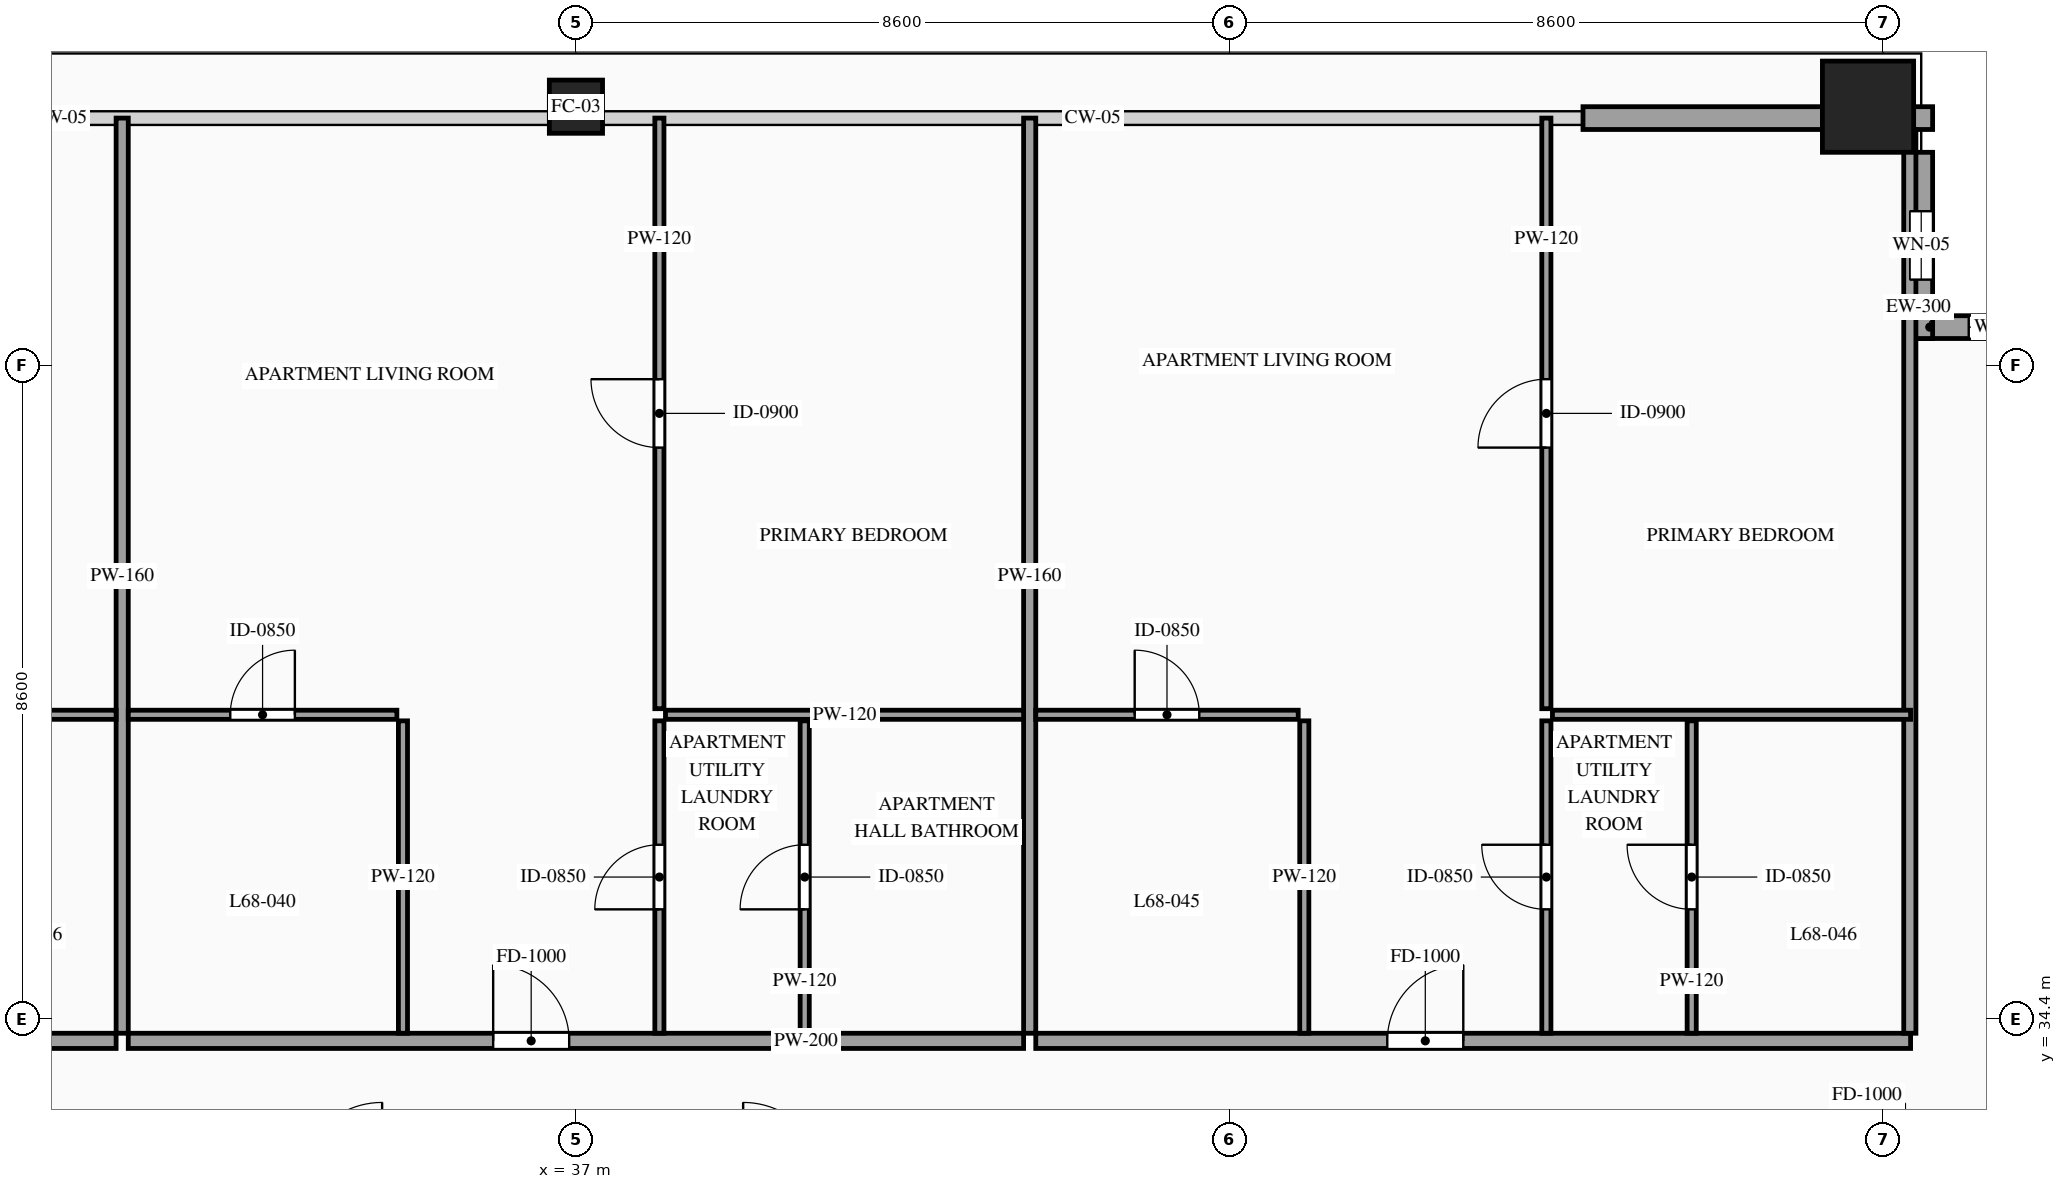
"""IFC4 building model, lengths in metres.
Left out: names, types, materials, properties, quantities, classifications, styles, units other than length and angle.
Written with IfcOpenShell. Run it as: python <this file> out.ifc"""

import sys

from ifc_helpers import new_model, si_unit, direction, frame, frame_2d, origin, origin_2d, place, context, subcontext, project, spatial, rectangle, hollow_rectangle, extrude, source, transform, mapped, element, fill, save


model = new_model("IFC4")
c1 = context("Model", 3, precision=1e-05, world=origin(), true_north=direction((0.0, 1.0)))
c2 = subcontext(c1, "Body", "Model", "MODEL_VIEW")
j1 = project(units=[si_unit("LENGTHUNIT", "METRE"), si_unit("PLANEANGLEUNIT", "RADIAN")], contexts=[c1])
p1 = place(None, origin())
s1 = spatial("IfcSite", under=j1, at=p1, CompositionType="ELEMENT")
p2 = place(p1, origin())
s2 = spatial("IfcBuilding", under=s1, at=p2, CompositionType="ELEMENT")
p3 = place(p2, frame((0.0, 0.0, 255.6)))
s3 = spatial("IfcBuildingStorey", under=s2, at=p3, CompositionType="ELEMENT", Elevation=255.6)
m1 = source(origin(), c2, "Body", "SweptSolid", [
    extrude(hollow_rectangle(XDim=0.7, YDim=0.7, WallThickness=0.032, at=origin_2d()), origin(), (0.0, 0.0, 1.0), 3.5),
])
p4 = place(p3, frame((37.0, 46.4, 0.0), z_axis=(0.0, 0.0, 1.0), x_axis=(1.0, 0.0, 0.0)))
e1 = element("IfcColumn", 1, at=p4, inside=s3, PredefinedType="COLUMN", context=c2, shape_type="MappedRepresentation", body=[
    mapped(m1, transform((0.0, 0.0, 0.0), scale=1.0)),
])
m2 = source(origin(), c2, "Body", "SweptSolid", [
    extrude(hollow_rectangle(XDim=1.2, YDim=1.2, WallThickness=0.055, at=origin_2d()), origin(), (0.0, 0.0, 1.0), 3.5),
])
p5 = place(p3, frame((54.0, 46.4, 0.0), z_axis=(0.0, 0.0, 1.0), x_axis=(1.0, 0.0, 0.0)))
e2 = element("IfcColumn", 2, at=p5, inside=s3, PredefinedType="COLUMN", context=c2, shape_type="MappedRepresentation", body=[
    mapped(m2, transform((0.0, 0.0, 0.0), scale=1.0)),
])
p6 = place(p3, frame((57.0, 43.5, 0.0), z_axis=(0.0, 0.0, 1.0), x_axis=(-1.0, 0.0, 0.0)))
e3 = element("IfcWall", 3, at=p6, inside=s3, PredefinedType="SOLIDWALL", context=c2, shape_type="SweptSolid", body=[
    extrude(rectangle(XDim=2.45, YDim=0.3, at=frame_2d((1.225, 0.0))), origin(), (0.0, 0.0, 1.0), 3.2),
])
p7 = place(p6, frame((0.775, 0.0, 0.75)))
e4 = element("IfcOpeningElement", 4, at=p7, cuts=e3, PredefinedType="OPENING", context=c2, shape_type="SweptSolid", body=[
    extrude(rectangle(XDim=0.9, YDim=1.5, at=frame_2d((0.45, 0.75))), frame((0.0, 0.165, 0.0), z_axis=(0.0, -1.0, 0.0), x_axis=(1.0, 0.0, 0.0)), (0.0, 0.0, 1.0), 0.33),
])
p8 = place(p3, frame((54.7, 43.35, 0.0), z_axis=(0.0, 0.0, 1.0), x_axis=(0.0, 1.0, 0.0)))
e5 = element("IfcWall", 5, at=p8, inside=s3, PredefinedType="SOLIDWALL", context=c2, shape_type="SweptSolid", body=[
    extrude(rectangle(XDim=2.45, YDim=0.3, at=frame_2d((1.225, 0.0))), origin(), (0.0, 0.0, 1.0), 3.2),
])
p9 = place(p8, frame((0.775, 0.0, 0.75)))
e6 = element("IfcOpeningElement", 6, at=p9, cuts=e5, PredefinedType="OPENING", context=c2, shape_type="SweptSolid", body=[
    extrude(rectangle(XDim=0.9, YDim=1.5, at=frame_2d((0.45, 0.75))), frame((0.0, 0.165, 0.0), z_axis=(0.0, -1.0, 0.0), x_axis=(1.0, 0.0, 0.0)), (0.0, 0.0, 1.0), 0.33),
])
m3 = source(origin(), c2, "Body", "SweptSolid", [
    extrude(rectangle(XDim=0.25, YDim=0.3, at=frame_2d((0.125, 0.0))), origin(), (0.0, 0.0, 1.0), 3.2),
])
p10 = place(p3, frame((54.6, 46.25, 0.0), z_axis=(0.0, 0.0, 1.0), x_axis=(1.0, 0.0, 0.0)))
e7 = element("IfcWall", 7, at=p10, inside=s3, PredefinedType="SOLIDWALL", context=c2, shape_type="MappedRepresentation", body=[
    mapped(m3, transform((0.0, 0.0, 0.0), scale=1.0)),
])
m4 = source(origin(), c2, "Body", "SweptSolid", [
    extrude(rectangle(XDim=3.15, YDim=0.3, at=frame_2d((1.575, 0.0))), origin(), (0.0, 0.0, 1.0), 2.755),
])
p11 = place(p3, frame((50.25, 46.25, 0.0), z_axis=(0.0, 0.0, 1.0), x_axis=(1.0, 0.0, 0.0)))
e8 = element("IfcWall", 8, at=p11, inside=s3, PredefinedType="SOLIDWALL", context=c2, shape_type="MappedRepresentation", body=[
    mapped(m4, transform((0.0, 0.0, 0.0), scale=1.0)),
])
p12 = place(p3, frame((19.44, 34.11, 0.0), z_axis=(0.0, 0.0, 1.0), x_axis=(1.0, 0.0, 0.0)))
e9 = element("IfcWall", 9, at=p12, inside=s3, PredefinedType="PARTITIONING", context=c2, shape_type="SweptSolid", body=[
    extrude(rectangle(XDim=11.51, YDim=0.2, at=frame_2d((5.755, 0.0))), origin(), (0.0, 0.0, 1.0), 3.2),
])
p13 = place(p12, frame((4.626, 0.0, 0.0)))
e10 = element("IfcOpeningElement", 10, at=p13, cuts=e9, PredefinedType="OPENING", context=c2, shape_type="SweptSolid", body=[
    extrude(rectangle(XDim=1.0, YDim=2.2, at=frame_2d((0.5, 1.1))), frame((0.0, 0.115, 0.0), z_axis=(0.0, -1.0, 0.0), x_axis=(1.0, 0.0, 0.0)), (0.0, 0.0, 1.0), 0.23),
])
m5 = source(origin(), c2, "Body", "SweptSolid", [
    extrude(rectangle(XDim=12.04, YDim=0.16, at=frame_2d((6.02, 0.0))), origin(), (0.0, 0.0, 1.0), 3.2),
])
p14 = place(p3, frame((31.03, 34.21, 0.0), z_axis=(0.0, 0.0, 1.0), x_axis=(0.0, 1.0, 0.0)))
e11 = element("IfcWall", 11, at=p14, inside=s3, PredefinedType="PARTITIONING", context=c2, shape_type="MappedRepresentation", body=[
    mapped(m5, transform((0.0, 0.0, 0.0), scale=1.0)),
])
m6 = source(origin(), c2, "Body", "SweptSolid", [
    extrude(rectangle(XDim=4.712, YDim=0.12, at=frame_2d((2.356, 0.0))), origin(), (0.0, 0.0, 1.0), 3.2),
])
p15 = place(p3, frame((26.238, 38.4, 0.0), z_axis=(0.0, 0.0, 1.0), x_axis=(1.0, 0.0, 0.0)))
e12 = element("IfcWall", 12, at=p15, inside=s3, PredefinedType="PARTITIONING", context=c2, shape_type="MappedRepresentation", body=[
    mapped(m6, transform((0.0, 0.0, 0.0), scale=1.0)),
])
p16 = place(p3, frame((31.11, 34.11, 0.0), z_axis=(0.0, 0.0, 1.0), x_axis=(1.0, 0.0, 0.0)))
e13 = element("IfcWall", 13, at=p16, inside=s3, PredefinedType="PARTITIONING", context=c2, shape_type="SweptSolid", body=[
    extrude(rectangle(XDim=11.78, YDim=0.2, at=frame_2d((5.89, 0.0))), origin(), (0.0, 0.0, 1.0), 3.2),
])
p17 = place(p16, frame((4.801, 0.0, 0.0)))
e14 = element("IfcOpeningElement", 14, at=p17, cuts=e13, PredefinedType="OPENING", context=c2, shape_type="SweptSolid", body=[
    extrude(rectangle(XDim=1.0, YDim=2.2, at=frame_2d((0.5, 1.1))), frame((0.0, 0.115, 0.0), z_axis=(0.0, -1.0, 0.0), x_axis=(1.0, 0.0, 0.0)), (0.0, 0.0, 1.0), 0.23),
])
p18 = place(p3, frame((42.97, 34.21, 0.0), z_axis=(0.0, 0.0, 1.0), x_axis=(0.0, 1.0, 0.0)))
e15 = element("IfcWall", 15, at=p18, inside=s3, PredefinedType="PARTITIONING", context=c2, shape_type="MappedRepresentation", body=[
    mapped(m5, transform((0.0, 0.0, 0.0), scale=1.0)),
])
p19 = place(p3, frame((31.11, 38.4, 0.0), z_axis=(0.0, 0.0, 1.0), x_axis=(1.0, 0.0, 0.0)))
e16 = element("IfcWall", 16, at=p19, inside=s3, PredefinedType="PARTITIONING", context=c2, shape_type="SweptSolid", body=[
    extrude(rectangle(XDim=3.534, YDim=0.12, at=frame_2d((1.767, 0.0))), origin(), (0.0, 0.0, 1.0), 3.2),
])
p20 = place(p19, frame((1.342, 0.0, 0.0)))
e17 = element("IfcOpeningElement", 17, at=p20, cuts=e16, PredefinedType="OPENING", context=c2, shape_type="SweptSolid", body=[
    extrude(rectangle(XDim=0.85, YDim=2.1, at=frame_2d((0.425, 1.05))), frame((0.0, 0.075, 0.0), z_axis=(0.0, -1.0, 0.0), x_axis=(1.0, 0.0, 0.0)), (0.0, 0.0, 1.0), 0.15),
])
m7 = source(origin(), c2, "Body", "SweptSolid", [
    extrude(rectangle(XDim=4.11, YDim=0.12, at=frame_2d((2.055, 0.0))), origin(), (0.0, 0.0, 1.0), 3.2),
])
p21 = place(p3, frame((34.724, 34.21, 0.0), z_axis=(0.0, 0.0, 1.0), x_axis=(0.0, 1.0, 0.0)))
e18 = element("IfcWall", 18, at=p21, inside=s3, PredefinedType="PARTITIONING", context=c2, shape_type="MappedRepresentation", body=[
    mapped(m7, transform((0.0, 0.0, 0.0), scale=1.0)),
])
p22 = place(p3, frame((40.01, 34.21, 0.0), z_axis=(0.0, 0.0, 1.0), x_axis=(0.0, 1.0, 0.0)))
e19 = element("IfcWall", 19, at=p22, inside=s3, PredefinedType="PARTITIONING", context=c2, shape_type="SweptSolid", body=[
    extrude(rectangle(XDim=4.11, YDim=0.12, at=frame_2d((2.055, 0.0))), origin(), (0.0, 0.0, 1.0), 3.2),
])
p23 = place(p22, frame((1.63, 0.0, 0.0)))
e20 = element("IfcOpeningElement", 20, at=p23, cuts=e19, PredefinedType="OPENING", context=c2, shape_type="SweptSolid", body=[
    extrude(rectangle(XDim=0.85, YDim=2.1, at=frame_2d((0.425, 1.05))), frame((0.0, 0.075, 0.0), z_axis=(0.0, -1.0, 0.0), x_axis=(1.0, 0.0, 0.0)), (0.0, 0.0, 1.0), 0.15),
])
p24 = place(p3, frame((38.178, 38.4, 0.0), z_axis=(0.0, 0.0, 1.0), x_axis=(1.0, 0.0, 0.0)))
e21 = element("IfcWall", 21, at=p24, inside=s3, PredefinedType="PARTITIONING", context=c2, shape_type="MappedRepresentation", body=[
    mapped(m6, transform((0.0, 0.0, 0.0), scale=1.0)),
])
p25 = place(p3, frame((38.098, 38.48, 0.0), z_axis=(0.0, 0.0, 1.0), x_axis=(0.0, 1.0, 0.0)))
e22 = element("IfcWall", 22, at=p25, inside=s3, PredefinedType="PARTITIONING", context=c2, shape_type="SweptSolid", body=[
    extrude(rectangle(XDim=7.77, YDim=0.12, at=frame_2d((3.885, 0.0))), origin(), (0.0, 0.0, 1.0), 3.2),
])
p26 = place(p25, frame((3.435, 0.0, 0.0)))
e23 = element("IfcOpeningElement", 23, at=p26, cuts=e22, PredefinedType="OPENING", context=c2, shape_type="SweptSolid", body=[
    extrude(rectangle(XDim=0.9, YDim=2.15, at=frame_2d((0.45, 1.075))), frame((0.0, 0.075, 0.0), z_axis=(0.0, -1.0, 0.0), x_axis=(1.0, 0.0, 0.0)), (0.0, 0.0, 1.0), 0.15),
])
p27 = place(p3, frame((38.098, 34.21, 0.0), z_axis=(0.0, 0.0, 1.0), x_axis=(0.0, 1.0, 0.0)))
e24 = element("IfcWall", 24, at=p27, inside=s3, PredefinedType="PARTITIONING", context=c2, shape_type="SweptSolid", body=[
    extrude(rectangle(XDim=4.11, YDim=0.12, at=frame_2d((2.055, 0.0))), origin(), (0.0, 0.0, 1.0), 3.2),
])
p28 = place(p27, frame((1.63, 0.0, 0.0)))
e25 = element("IfcOpeningElement", 25, at=p28, cuts=e24, PredefinedType="OPENING", context=c2, shape_type="SweptSolid", body=[
    extrude(rectangle(XDim=0.85, YDim=2.1, at=frame_2d((0.425, 1.05))), frame((0.0, 0.075, 0.0), z_axis=(0.0, -1.0, 0.0), x_axis=(1.0, 0.0, 0.0)), (0.0, 0.0, 1.0), 0.15),
])
p29 = place(p3, frame((43.05, 34.11, 0.0), z_axis=(0.0, 0.0, 1.0), x_axis=(1.0, 0.0, 0.0)))
e26 = element("IfcWall", 26, at=p29, inside=s3, PredefinedType="PARTITIONING", context=c2, shape_type="SweptSolid", body=[
    extrude(rectangle(XDim=11.51, YDim=0.2, at=frame_2d((5.755, 0.0))), origin(), (0.0, 0.0, 1.0), 3.2),
])
p30 = place(p29, frame((4.625, 0.0, 0.0)))
e27 = element("IfcOpeningElement", 27, at=p30, cuts=e26, PredefinedType="OPENING", context=c2, shape_type="SweptSolid", body=[
    extrude(rectangle(XDim=1.0, YDim=2.2, at=frame_2d((0.5, 1.1))), frame((0.0, 0.115, 0.0), z_axis=(0.0, -1.0, 0.0), x_axis=(1.0, 0.0, 0.0)), (0.0, 0.0, 1.0), 0.23),
])
m8 = source(origin(), c2, "Body", "SweptSolid", [
    extrude(rectangle(XDim=11.89, YDim=0.16, at=frame_2d((5.945, 0.0))), origin(), (0.0, 0.0, 1.0), 3.2),
])
p31 = place(p3, frame((54.55, 34.21, 0.0), z_axis=(0.0, 0.0, 1.0), x_axis=(0.0, 1.0, 0.0)))
e28 = element("IfcWall", 28, at=p31, inside=s3, PredefinedType="PARTITIONING", context=c2, shape_type="MappedRepresentation", body=[
    mapped(m8, transform((0.0, 0.0, 0.0), scale=1.0)),
])
p32 = place(p3, frame((43.05, 38.4, 0.0), z_axis=(0.0, 0.0, 1.0), x_axis=(1.0, 0.0, 0.0)))
e29 = element("IfcWall", 29, at=p32, inside=s3, PredefinedType="PARTITIONING", context=c2, shape_type="SweptSolid", body=[
    extrude(rectangle(XDim=3.453, YDim=0.12, at=frame_2d((1.727, 0.0))), origin(), (0.0, 0.0, 1.0), 3.2),
])
p33 = place(p32, frame((1.302, 0.0, 0.0)))
e30 = element("IfcOpeningElement", 30, at=p33, cuts=e29, PredefinedType="OPENING", context=c2, shape_type="SweptSolid", body=[
    extrude(rectangle(XDim=0.85, YDim=2.1, at=frame_2d((0.425, 1.05))), frame((0.0, 0.075, 0.0), z_axis=(0.0, -1.0, 0.0), x_axis=(1.0, 0.0, 0.0)), (0.0, 0.0, 1.0), 0.15),
])
p34 = place(p3, frame((46.583, 34.21, 0.0), z_axis=(0.0, 0.0, 1.0), x_axis=(0.0, 1.0, 0.0)))
e31 = element("IfcWall", 31, at=p34, inside=s3, PredefinedType="PARTITIONING", context=c2, shape_type="MappedRepresentation", body=[
    mapped(m7, transform((0.0, 0.0, 0.0), scale=1.0)),
])
p35 = place(p3, frame((51.68, 34.21, 0.0), z_axis=(0.0, 0.0, 1.0), x_axis=(0.0, 1.0, 0.0)))
e32 = element("IfcWall", 32, at=p35, inside=s3, PredefinedType="PARTITIONING", context=c2, shape_type="SweptSolid", body=[
    extrude(rectangle(XDim=4.11, YDim=0.12, at=frame_2d((2.055, 0.0))), origin(), (0.0, 0.0, 1.0), 3.2),
])
p36 = place(p35, frame((1.63, 0.0, 0.0)))
e33 = element("IfcOpeningElement", 33, at=p36, cuts=e32, PredefinedType="OPENING", context=c2, shape_type="SweptSolid", body=[
    extrude(rectangle(XDim=0.85, YDim=2.1, at=frame_2d((0.425, 1.05))), frame((0.0, 0.075, 0.0), z_axis=(0.0, -1.0, 0.0), x_axis=(1.0, 0.0, 0.0)), (0.0, 0.0, 1.0), 0.15),
])
m9 = source(origin(), c2, "Body", "SweptSolid", [
    extrude(rectangle(XDim=4.712, YDim=0.12, at=frame_2d((2.356, 0.0))), origin(), (0.0, 0.0, 1.0), 3.2),
])
p37 = place(p3, frame((49.848, 38.4, 0.0), z_axis=(0.0, 0.0, 1.0), x_axis=(1.0, 0.0, 0.0)))
e34 = element("IfcWall", 34, at=p37, inside=s3, PredefinedType="PARTITIONING", context=c2, shape_type="MappedRepresentation", body=[
    mapped(m9, transform((0.0, 0.0, 0.0), scale=1.0)),
])
p38 = place(p3, frame((49.768, 38.48, 0.0), z_axis=(0.0, 0.0, 1.0), x_axis=(0.0, 1.0, 0.0)))
e35 = element("IfcWall", 35, at=p38, inside=s3, PredefinedType="PARTITIONING", context=c2, shape_type="SweptSolid", body=[
    extrude(rectangle(XDim=7.77, YDim=0.12, at=frame_2d((3.885, 0.0))), origin(), (0.0, 0.0, 1.0), 3.2),
])
p39 = place(p38, frame((3.435, 0.0, 0.0)))
e36 = element("IfcOpeningElement", 36, at=p39, cuts=e35, PredefinedType="OPENING", context=c2, shape_type="SweptSolid", body=[
    extrude(rectangle(XDim=0.9, YDim=2.15, at=frame_2d((0.45, 1.075))), frame((0.0, 0.075, 0.0), z_axis=(0.0, -1.0, 0.0), x_axis=(1.0, 0.0, 0.0)), (0.0, 0.0, 1.0), 0.15),
])
p40 = place(p3, frame((49.768, 34.21, 0.0), z_axis=(0.0, 0.0, 1.0), x_axis=(0.0, 1.0, 0.0)))
e37 = element("IfcWall", 37, at=p40, inside=s3, PredefinedType="PARTITIONING", context=c2, shape_type="SweptSolid", body=[
    extrude(rectangle(XDim=4.11, YDim=0.12, at=frame_2d((2.055, 0.0))), origin(), (0.0, 0.0, 1.0), 3.2),
])
p41 = place(p40, frame((1.63, 0.0, 0.0)))
e38 = element("IfcOpeningElement", 38, at=p41, cuts=e37, PredefinedType="OPENING", context=c2, shape_type="SweptSolid", body=[
    extrude(rectangle(XDim=0.85, YDim=2.1, at=frame_2d((0.425, 1.05))), frame((0.0, 0.075, 0.0), z_axis=(0.0, -1.0, 0.0), x_axis=(1.0, 0.0, 0.0)), (0.0, 0.0, 1.0), 0.15),
])
m10 = source(origin(), c2, "Body", "SweptSolid", [
    extrude(rectangle(XDim=0.9, YDim=1.5, at=frame_2d((0.45, 0.75))), frame((0.0, 0.03, 0.0), z_axis=(0.0, -1.0, 0.0), x_axis=(1.0, 0.0, 0.0)), (0.0, 0.0, 1.0), 0.06),
])
p42 = place(p7, origin())
e39 = element("IfcWindow", 39, at=p42, inside=s3, PartitioningType="SINGLE_PANEL", PredefinedType="WINDOW", context=c2, shape_type="MappedRepresentation", body=[
    mapped(m10, transform((0.0, 0.0, 0.0), scale=1.0)),
])
fill(e4, e39)
p43 = place(p9, origin())
e40 = element("IfcWindow", 40, at=p43, inside=s3, PartitioningType="SINGLE_PANEL", PredefinedType="WINDOW", context=c2, shape_type="MappedRepresentation", body=[
    mapped(m10, transform((0.0, 0.0, 0.0), scale=1.0)),
])
fill(e6, e40)
m11 = source(origin(), c2, "Body", "SweptSolid", [
    extrude(rectangle(XDim=1.0, YDim=2.2, at=frame_2d((0.5, 1.1))), frame((0.0, 0.025, 0.0), z_axis=(0.0, -1.0, 0.0), x_axis=(1.0, 0.0, 0.0)), (0.0, 0.0, 1.0), 0.05),
])
p44 = place(p17, origin())
e41 = element("IfcDoor", 41, at=p44, inside=s3, OperationType="SINGLE_SWING_LEFT", PredefinedType="DOOR", context=c2, shape_type="MappedRepresentation", body=[
    mapped(m11, transform((0.0, 0.0, 0.0), scale=1.0)),
])
fill(e14, e41)
m12 = source(origin(), c2, "Body", "SweptSolid", [
    extrude(rectangle(XDim=0.85, YDim=2.1, at=frame_2d((0.425, 1.05))), frame((0.0, 0.025, 0.0), z_axis=(0.0, -1.0, 0.0), x_axis=(1.0, 0.0, 0.0)), (0.0, 0.0, 1.0), 0.05),
])
p45 = place(p20, origin())
e42 = element("IfcDoor", 42, at=p45, inside=s3, OperationType="SINGLE_SWING_RIGHT", PredefinedType="DOOR", context=c2, shape_type="MappedRepresentation", body=[
    mapped(m12, transform((0.0, 0.0, 0.0), scale=1.0)),
])
fill(e17, e42)
p46 = place(p23, origin())
e43 = element("IfcDoor", 43, at=p46, inside=s3, OperationType="SINGLE_SWING_LEFT", PredefinedType="DOOR", context=c2, shape_type="MappedRepresentation", body=[
    mapped(m12, transform((0.0, 0.0, 0.0), scale=1.0)),
])
fill(e20, e43)
m13 = source(origin(), c2, "Body", "SweptSolid", [
    extrude(rectangle(XDim=0.9, YDim=2.15, at=frame_2d((0.45, 1.075))), frame((0.0, 0.025, 0.0), z_axis=(0.0, -1.0, 0.0), x_axis=(1.0, 0.0, 0.0)), (0.0, 0.0, 1.0), 0.05),
])
p47 = place(p26, origin())
e44 = element("IfcDoor", 44, at=p47, inside=s3, OperationType="SINGLE_SWING_RIGHT", PredefinedType="DOOR", context=c2, shape_type="MappedRepresentation", body=[
    mapped(m13, transform((0.0, 0.0, 0.0), scale=1.0)),
])
fill(e23, e44)
p48 = place(p28, origin())
e45 = element("IfcDoor", 45, at=p48, inside=s3, OperationType="SINGLE_SWING_LEFT", PredefinedType="DOOR", context=c2, shape_type="MappedRepresentation", body=[
    mapped(m12, transform((0.0, 0.0, 0.0), scale=1.0)),
])
fill(e25, e45)
p49 = place(p30, origin())
e46 = element("IfcDoor", 46, at=p49, inside=s3, OperationType="SINGLE_SWING_RIGHT", PredefinedType="DOOR", context=c2, shape_type="MappedRepresentation", body=[
    mapped(m11, transform((0.0, 0.0, 0.0), scale=1.0)),
])
fill(e27, e46)
p50 = place(p33, origin())
e47 = element("IfcDoor", 47, at=p50, inside=s3, OperationType="SINGLE_SWING_LEFT", PredefinedType="DOOR", context=c2, shape_type="MappedRepresentation", body=[
    mapped(m12, transform((0.0, 0.0, 0.0), scale=1.0)),
])
fill(e30, e47)
p51 = place(p36, origin())
e48 = element("IfcDoor", 48, at=p51, inside=s3, OperationType="SINGLE_SWING_RIGHT", PredefinedType="DOOR", context=c2, shape_type="MappedRepresentation", body=[
    mapped(m12, transform((0.0, 0.0, 0.0), scale=1.0)),
])
fill(e33, e48)
p52 = place(p39, origin())
e49 = element("IfcDoor", 49, at=p52, inside=s3, OperationType="SINGLE_SWING_LEFT", PredefinedType="DOOR", context=c2, shape_type="MappedRepresentation", body=[
    mapped(m13, transform((0.0, 0.0, 0.0), scale=1.0)),
])
fill(e36, e49)
p53 = place(p41, origin())
e50 = element("IfcDoor", 50, at=p53, inside=s3, OperationType="SINGLE_SWING_RIGHT", PredefinedType="DOOR", context=c2, shape_type="MappedRepresentation", body=[
    mapped(m12, transform((0.0, 0.0, 0.0), scale=1.0)),
])
fill(e38, e50)
save(model, sys.argv[1])
